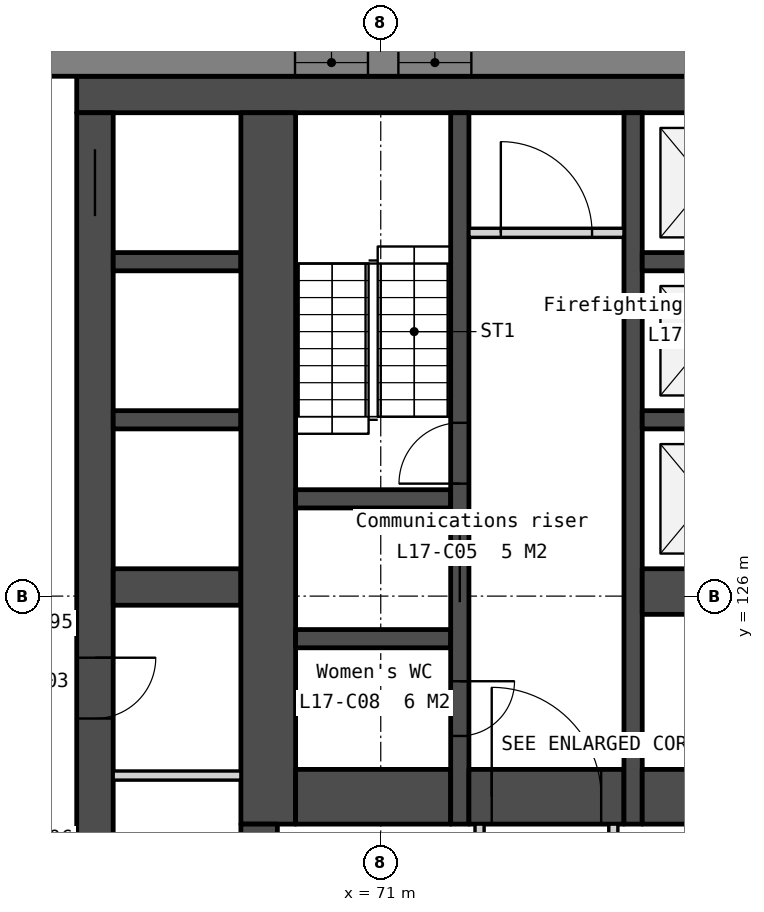
"""IFC4 building model, lengths in metres.
Left out: names, types, materials, properties, quantities, classifications, styles, units other than length and angle.
Written with IfcOpenShell. Run it as: python <this file> out.ifc"""

import sys

from ifc_helpers import new_model, si_unit, direction, frame, frame_2d, origin, place, context, subcontext, project, spatial, polyline, rectangle, outline, extrude, element, fill, save


model = new_model("IFC4")
c1 = context("Model", 3, precision=1e-05, world=origin(), true_north=direction((0.0, 1.0)))
c2 = subcontext(c1, "Body", "Model", "MODEL_VIEW")
j1 = project(units=[si_unit("LENGTHUNIT", "METRE"), si_unit("PLANEANGLEUNIT", "RADIAN")], contexts=[c1])
p1 = place(None, origin())
s1 = spatial("IfcSite", under=j1, at=p1, CompositionType="ELEMENT")
p2 = place(p1, origin())
s2 = spatial("IfcBuilding", under=s1, at=p2, CompositionType="ELEMENT")
p3 = place(p2, frame((0.0, 0.0, 73.5)))
s3 = spatial("IfcBuildingStorey", under=s2, at=p3, CompositionType="ELEMENT", Elevation=73.5)
p4 = place(p3, frame((66.0, 134.25, 0.0), z_axis=(0.0, 0.0, 1.0), x_axis=(1.0, 0.0, 0.0)))
e1 = element("IfcWall", 1, at=p4, inside=s3, PredefinedType="SOLIDWALL", context=c2, shape_type="SweptSolid", body=[
    extrude(rectangle(XDim=28.0, YDim=0.6, at=frame_2d((14.0, 0.0))), origin(), (0.0, 0.0, 1.0), 3.25),
])
p5 = place(p3, frame((66.3, 133.95, 0.0), z_axis=(0.0, 0.0, 1.0), x_axis=(0.0, -1.0, 0.0)))
e2 = element("IfcWall", 2, at=p5, inside=s3, PredefinedType="SOLIDWALL", context=c2, shape_type="SweptSolid", body=[
    extrude(rectangle(XDim=13.8, YDim=0.6, at=frame_2d((6.9, 0.0))), origin(), (0.0, 0.0, 1.0), 3.25),
])
p6 = place(p5, frame((0.6, 0.0, 0.0)))
e3 = element("IfcOpeningElement", 3, at=p6, cuts=e2, PredefinedType="OPENING", context=c2, shape_type="SweptSolid", body=[
    extrude(rectangle(XDim=1.1, YDim=2.1, at=frame_2d((0.55, 1.05))), frame((0.0, 0.31, 0.0), z_axis=(0.0, -1.0, 0.0), x_axis=(1.0, 0.0, 0.0)), (0.0, 0.0, 1.0), 0.62),
])
p7 = place(p5, frame((8.963, 0.0, 0.0)))
e4 = element("IfcOpeningElement", 4, at=p7, cuts=e2, PredefinedType="OPENING", context=c2, shape_type="SweptSolid", body=[
    extrude(rectangle(XDim=1.0, YDim=2.1, at=frame_2d((0.5, 1.05))), frame((0.0, 0.31, 0.0), z_axis=(0.0, -1.0, 0.0), x_axis=(1.0, 0.0, 0.0)), (0.0, 0.0, 1.0), 0.62),
])
p8 = place(p5, frame((11.888, 0.0, 0.0)))
e5 = element("IfcOpeningElement", 5, at=p8, cuts=e2, PredefinedType="OPENING", context=c2, shape_type="SweptSolid", body=[
    extrude(rectangle(XDim=1.0, YDim=2.1, at=frame_2d((0.5, 1.05))), frame((0.0, 0.31, 0.0), z_axis=(0.0, -1.0, 0.0), x_axis=(1.0, 0.0, 0.0)), (0.0, 0.0, 1.0), 0.62),
])
for number, where, z_axis, x_axis in (
    (6, (66.6, 131.5, 0.0), (0.0, 0.0, 1.0), (1.0, 0.0, 0.0)),
    (7, (66.6, 128.9, 0.0), (0.0, 0.0, 1.0), (1.0, 0.0, 0.0)),
):
    element("IfcWall", number, at=place(p3, frame(where, z_axis=z_axis, x_axis=x_axis)), inside=s3, PredefinedType="SOLIDWALL", context=c2, shape_type="SweptSolid", body=[
        extrude(rectangle(XDim=2.1, YDim=0.3, at=frame_2d((1.05, 0.0))), origin(), (0.0, 0.0, 1.0), 3.25),
    ])
p9 = place(p3, frame((66.6, 126.15, 0.0), z_axis=(0.0, 0.0, 1.0), x_axis=(1.0, 0.0, 0.0)))
e8 = element("IfcWall", 8, at=p9, inside=s3, PredefinedType="SOLIDWALL", context=c2, shape_type="SweptSolid", body=[
    extrude(rectangle(XDim=2.1, YDim=0.6, at=frame_2d((1.05, 0.0))), origin(), (0.0, 0.0, 1.0), 3.25),
])
p10 = place(p3, frame((66.6, 123.049, 0.0), z_axis=(0.0, 0.0, 1.0), x_axis=(1.0, 0.0, 0.0)))
e9 = element("IfcWall", 9, at=p10, inside=s3, PredefinedType="PARTITIONING", context=c2, shape_type="SweptSolid", body=[
    extrude(rectangle(XDim=2.1, YDim=0.15, at=frame_2d((1.05, 0.0))), origin(), (0.0, 0.0, 1.0), 3.25),
])
p11 = place(p3, frame((69.15, 133.95, 0.0), z_axis=(0.0, 0.0, 1.0), x_axis=(0.0, -1.0, 0.0)))
e10 = element("IfcWall", 10, at=p11, inside=s3, PredefinedType="SOLIDWALL", context=c2, shape_type="SweptSolid", body=[
    extrude(rectangle(XDim=11.7, YDim=0.9, at=frame_2d((5.85, 0.0))), origin(), (0.0, 0.0, 1.0), 3.25),
])
p12 = place(p3, frame((69.0, 122.25, 0.0), z_axis=(0.0, 0.0, 1.0), x_axis=(0.0, -1.0, 0.0)))
e11 = element("IfcWall", 11, at=p12, inside=s3, PredefinedType="SOLIDWALL", context=c2, shape_type="SweptSolid", body=[
    extrude(rectangle(XDim=2.1, YDim=0.6, at=frame_2d((1.05, 0.0))), origin(), (0.0, 0.0, 1.0), 3.25),
])
for number, where, z_axis, x_axis in (
    (12, (69.6, 127.6, 0.0), (0.0, 0.0, 1.0), (1.0, 0.0, 0.0)),
    (13, (69.6, 125.3, 0.0), (0.0, 0.0, 1.0), (1.0, 0.0, 0.0)),
):
    element("IfcWall", number, at=place(p3, frame(where, z_axis=z_axis, x_axis=x_axis)), inside=s3, PredefinedType="SOLIDWALL", context=c2, shape_type="SweptSolid", body=[
        extrude(rectangle(XDim=2.55, YDim=0.3, at=frame_2d((1.275, 0.0))), origin(), (0.0, 0.0, 1.0), 3.25),
    ])
p13 = place(p3, frame((69.6, 122.7, 0.0), z_axis=(0.0, 0.0, 1.0), x_axis=(1.0, 0.0, 0.0)))
e14 = element("IfcWall", 14, at=p13, inside=s3, PredefinedType="SOLIDWALL", context=c2, shape_type="SweptSolid", body=[
    extrude(rectangle(XDim=2.55, YDim=0.9, at=frame_2d((1.275, 0.0))), origin(), (0.0, 0.0, 1.0), 3.25),
])
p14 = place(p3, frame((72.3, 133.95, 0.0), z_axis=(0.0, 0.0, 1.0), x_axis=(0.0, -1.0, 0.0)))
e15 = element("IfcWall", 15, at=p14, inside=s3, PredefinedType="SOLIDWALL", context=c2, shape_type="SweptSolid", body=[
    extrude(rectangle(XDim=11.7, YDim=0.3, at=frame_2d((5.85, 0.0))), origin(), (0.0, 0.0, 1.0), 3.25),
])
p15 = place(p14, frame((6.95, 0.0, 0.0)))
e16 = element("IfcOpeningElement", 16, at=p15, cuts=e15, PredefinedType="OPENING", context=c2, shape_type="SweptSolid", body=[
    extrude(rectangle(XDim=1.1, YDim=2.1, at=frame_2d((0.55, 1.05))), frame((0.0, 0.16, 0.0), z_axis=(0.0, -1.0, 0.0), x_axis=(1.0, 0.0, 0.0)), (0.0, 0.0, 1.0), 0.32),
])
p16 = place(p14, frame((9.35, 0.0, 0.0)))
e17 = element("IfcOpeningElement", 17, at=p16, cuts=e15, PredefinedType="OPENING", context=c2, shape_type="SweptSolid", body=[
    extrude(rectangle(XDim=0.9, YDim=2.1, at=frame_2d((0.45, 1.05))), frame((0.0, 0.16, 0.0), z_axis=(0.0, -1.0, 0.0), x_axis=(1.0, 0.0, 0.0)), (0.0, 0.0, 1.0), 0.32),
])
p17 = place(p14, frame((5.1, 0.0, 0.0)))
e18 = element("IfcOpeningElement", 18, at=p17, cuts=e15, PredefinedType="OPENING", context=c2, shape_type="SweptSolid", body=[
    extrude(rectangle(XDim=1.0, YDim=2.1, at=frame_2d((0.5, 1.05))), frame((0.0, 0.16, 0.0), z_axis=(0.0, -1.0, 0.0), x_axis=(1.0, 0.0, 0.0)), (0.0, 0.0, 1.0), 0.32),
])
p18 = place(p3, frame((72.45, 131.975, 0.0), z_axis=(0.0, 0.0, 1.0), x_axis=(1.0, 0.0, 0.0)))
e19 = element("IfcWall", 19, at=p18, inside=s3, PredefinedType="PARTITIONING", context=c2, shape_type="SweptSolid", body=[
    extrude(rectangle(XDim=2.55, YDim=0.15, at=frame_2d((1.275, 0.0))), origin(), (0.0, 0.0, 1.0), 3.25),
])
p19 = place(p18, frame((0.525, 0.0, 0.0)))
e20 = element("IfcOpeningElement", 20, at=p19, cuts=e19, PredefinedType="OPENING", context=c2, shape_type="SweptSolid", body=[
    extrude(rectangle(XDim=1.5, YDim=2.1, at=frame_2d((0.75, 1.05))), frame((0.0, 0.085, 0.0), z_axis=(0.0, -1.0, 0.0), x_axis=(1.0, 0.0, 0.0)), (0.0, 0.0, 1.0), 0.17),
])
p20 = place(p3, frame((72.45, 122.7, 0.0), z_axis=(0.0, 0.0, 1.0), x_axis=(1.0, 0.0, 0.0)))
e21 = element("IfcWall", 21, at=p20, inside=s3, PredefinedType="SOLIDWALL", context=c2, shape_type="SweptSolid", body=[
    extrude(rectangle(XDim=2.55, YDim=0.9, at=frame_2d((1.275, 0.0))), origin(), (0.0, 0.0, 1.0), 3.25),
])
p21 = place(p20, frame((0.375, 0.0, 0.0)))
e22 = element("IfcOpeningElement", 22, at=p21, cuts=e21, PredefinedType="OPENING", context=c2, shape_type="SweptSolid", body=[
    extrude(rectangle(XDim=1.8, YDim=2.1, at=frame_2d((0.9, 1.05))), frame((0.0, 0.46, 0.0), z_axis=(0.0, -1.0, 0.0), x_axis=(1.0, 0.0, 0.0)), (0.0, 0.0, 1.0), 0.92),
])
for number, where, z_axis, x_axis in (
    (23, (72.625, 122.25, 0.0), (0.0, 0.0, 1.0), (0.0, -1.0, 0.0)),
    (24, (74.825, 122.25, 0.0), (0.0, 0.0, 1.0), (0.0, -1.0, 0.0)),
):
    element("IfcWall", number, at=place(p3, frame(where, z_axis=z_axis, x_axis=x_axis)), inside=s3, PredefinedType="PARTITIONING", context=c2, shape_type="SweptSolid", body=[
        extrude(rectangle(XDim=2.1, YDim=0.15, at=frame_2d((1.05, 0.0))), origin(), (0.0, 0.0, 1.0), 3.25),
    ])
p22 = place(p3, frame((75.15, 133.95, 0.0), z_axis=(0.0, 0.0, 1.0), x_axis=(0.0, -1.0, 0.0)))
e25 = element("IfcWall", 25, at=p22, inside=s3, PredefinedType="SOLIDWALL", context=c2, shape_type="SweptSolid", body=[
    extrude(rectangle(XDim=11.7, YDim=0.3, at=frame_2d((5.85, 0.0))), origin(), (0.0, 0.0, 1.0), 3.25),
])
for number, where, z_axis, x_axis in (
    (26, (75.3, 131.5, 0.0), (0.0, 0.0, 1.0), (1.0, 0.0, 0.0)),
    (27, (75.3, 128.9, 0.0), (0.0, 0.0, 1.0), (1.0, 0.0, 0.0)),
):
    element("IfcWall", number, at=place(p3, frame(where, z_axis=z_axis, x_axis=x_axis)), inside=s3, PredefinedType="SOLIDWALL", context=c2, shape_type="SweptSolid", body=[
        extrude(rectangle(XDim=2.1, YDim=0.3, at=frame_2d((1.05, 0.0))), origin(), (0.0, 0.0, 1.0), 3.25),
    ])
p23 = place(p3, frame((75.3, 126.075, 0.0), z_axis=(0.0, 0.0, 1.0), x_axis=(1.0, 0.0, 0.0)))
e28 = element("IfcWall", 28, at=p23, inside=s3, PredefinedType="SOLIDWALL", context=c2, shape_type="SweptSolid", body=[
    extrude(rectangle(XDim=2.1, YDim=0.75, at=frame_2d((1.05, 0.0))), origin(), (0.0, 0.0, 1.0), 3.25),
])
p24 = place(p3, frame((75.3, 122.7, 0.0), z_axis=(0.0, 0.0, 1.0), x_axis=(1.0, 0.0, 0.0)))
e29 = element("IfcWall", 29, at=p24, inside=s3, PredefinedType="SOLIDWALL", context=c2, shape_type="SweptSolid", body=[
    extrude(rectangle(XDim=6.2, YDim=0.9, at=frame_2d((3.1, 0.0))), origin(), (0.0, 0.0, 1.0), 3.25),
])
p25 = place(p3, frame((102.4, 134.775, -0.15), z_axis=(0.0, 0.0, 1.0), x_axis=(-1.0, 0.0, 0.0)))
e30 = element("IfcWall", 30, at=p25, inside=s3, PredefinedType="SOLIDWALL", context=c2, shape_type="SweptSolid", body=[
    extrude(outline(polyline([(44.8, 0.0), (44.8, 3.4), (0.0, 3.4), (0.0, 0.0), (44.8, 0.0)])), frame((0.0, 0.225, 0.0), z_axis=(0.0, -1.0, 0.0), x_axis=(1.0, 0.0, 0.0)), (0.0, 0.0, 1.0), 0.45),
])
p26 = place(p25, frame((3.03, 0.0, 1.05)))
e31 = element("IfcOpeningElement", 31, at=p26, cuts=e30, PredefinedType="OPENING", context=c2, shape_type="SweptSolid", body=[
    extrude(rectangle(XDim=1.2, YDim=1.5, at=frame_2d((0.6, 0.75))), frame((0.0, 0.235, 0.0), z_axis=(0.0, -1.0, 0.0), x_axis=(1.0, 0.0, 0.0)), (0.0, 0.0, 1.0), 0.47),
])
p27 = place(p25, frame((4.73, 0.0, 1.05)))
e32 = element("IfcOpeningElement", 32, at=p27, cuts=e30, PredefinedType="OPENING", context=c2, shape_type="SweptSolid", body=[
    extrude(rectangle(XDim=1.2, YDim=1.5, at=frame_2d((0.6, 0.75))), frame((0.0, 0.235, 0.0), z_axis=(0.0, -1.0, 0.0), x_axis=(1.0, 0.0, 0.0)), (0.0, 0.0, 1.0), 0.47),
])
p28 = place(p25, frame((11.99, 0.0, 1.05)))
e33 = element("IfcOpeningElement", 33, at=p28, cuts=e30, PredefinedType="OPENING", context=c2, shape_type="SweptSolid", body=[
    extrude(rectangle(XDim=1.2, YDim=1.5, at=frame_2d((0.6, 0.75))), frame((0.0, 0.235, 0.0), z_axis=(0.0, -1.0, 0.0), x_axis=(1.0, 0.0, 0.0)), (0.0, 0.0, 1.0), 0.47),
])
p29 = place(p25, frame((13.69, 0.0, 1.05)))
e34 = element("IfcOpeningElement", 34, at=p29, cuts=e30, PredefinedType="OPENING", context=c2, shape_type="SweptSolid", body=[
    extrude(rectangle(XDim=1.2, YDim=1.5, at=frame_2d((0.6, 0.75))), frame((0.0, 0.235, 0.0), z_axis=(0.0, -1.0, 0.0), x_axis=(1.0, 0.0, 0.0)), (0.0, 0.0, 1.0), 0.47),
])
p30 = place(p25, frame((20.95, 0.0, 1.05)))
e35 = element("IfcOpeningElement", 35, at=p30, cuts=e30, PredefinedType="OPENING", context=c2, shape_type="SweptSolid", body=[
    extrude(rectangle(XDim=1.2, YDim=1.5, at=frame_2d((0.6, 0.75))), frame((0.0, 0.235, 0.0), z_axis=(0.0, -1.0, 0.0), x_axis=(1.0, 0.0, 0.0)), (0.0, 0.0, 1.0), 0.47),
])
p31 = place(p25, frame((22.65, 0.0, 1.05)))
e36 = element("IfcOpeningElement", 36, at=p31, cuts=e30, PredefinedType="OPENING", context=c2, shape_type="SweptSolid", body=[
    extrude(rectangle(XDim=1.2, YDim=1.5, at=frame_2d((0.6, 0.75))), frame((0.0, 0.235, 0.0), z_axis=(0.0, -1.0, 0.0), x_axis=(1.0, 0.0, 0.0)), (0.0, 0.0, 1.0), 0.47),
])
p32 = place(p25, frame((29.91, 0.0, 1.05)))
e37 = element("IfcOpeningElement", 37, at=p32, cuts=e30, PredefinedType="OPENING", context=c2, shape_type="SweptSolid", body=[
    extrude(rectangle(XDim=1.2, YDim=1.5, at=frame_2d((0.6, 0.75))), frame((0.0, 0.235, 0.0), z_axis=(0.0, -1.0, 0.0), x_axis=(1.0, 0.0, 0.0)), (0.0, 0.0, 1.0), 0.47),
])
p33 = place(p25, frame((31.61, 0.0, 1.05)))
e38 = element("IfcOpeningElement", 38, at=p33, cuts=e30, PredefinedType="OPENING", context=c2, shape_type="SweptSolid", body=[
    extrude(rectangle(XDim=1.2, YDim=1.5, at=frame_2d((0.6, 0.75))), frame((0.0, 0.235, 0.0), z_axis=(0.0, -1.0, 0.0), x_axis=(1.0, 0.0, 0.0)), (0.0, 0.0, 1.0), 0.47),
])
p34 = place(p25, frame((38.87, 0.0, 1.05)))
e39 = element("IfcOpeningElement", 39, at=p34, cuts=e30, PredefinedType="OPENING", context=c2, shape_type="SweptSolid", body=[
    extrude(rectangle(XDim=1.2, YDim=1.5, at=frame_2d((0.6, 0.75))), frame((0.0, 0.235, 0.0), z_axis=(0.0, -1.0, 0.0), x_axis=(1.0, 0.0, 0.0)), (0.0, 0.0, 1.0), 0.47),
])
p35 = place(p25, frame((40.57, 0.0, 1.05)))
e40 = element("IfcOpeningElement", 40, at=p35, cuts=e30, PredefinedType="OPENING", context=c2, shape_type="SweptSolid", body=[
    extrude(rectangle(XDim=1.2, YDim=1.5, at=frame_2d((0.6, 0.75))), frame((0.0, 0.235, 0.0), z_axis=(0.0, -1.0, 0.0), x_axis=(1.0, 0.0, 0.0)), (0.0, 0.0, 1.0), 0.47),
])
p36 = place(p3, frame((54.495, 129.397, -0.15), z_axis=(0.0, 0.0, 1.0), x_axis=(0.499999201451, -0.866025864826, 0.0)))
e41 = element("IfcWall", 41, at=p36, inside=s3, PredefinedType="SOLIDWALL", context=c2, shape_type="SweptSolid", body=[
    extrude(outline(polyline([(44.8, 0.0), (44.8, 3.4), (0.0, 3.4), (0.0, 0.0), (44.8, 0.0)])), frame((0.0, 0.225, 0.0), z_axis=(0.0, -1.0, 0.0), x_axis=(1.0, 0.0, 0.0)), (0.0, 0.0, 1.0), 0.45),
])
p37 = place(p36, frame((3.03, 0.0, 1.05)))
e42 = element("IfcOpeningElement", 42, at=p37, cuts=e41, PredefinedType="OPENING", context=c2, shape_type="SweptSolid", body=[
    extrude(rectangle(XDim=1.2, YDim=1.5, at=frame_2d((0.6, 0.75))), frame((0.0, 0.235, 0.0), z_axis=(0.0, -1.0, 0.0), x_axis=(1.0, 0.0, 0.0)), (0.0, 0.0, 1.0), 0.47),
])
p38 = place(p36, frame((4.73, 0.0, 1.05)))
e43 = element("IfcOpeningElement", 43, at=p38, cuts=e41, PredefinedType="OPENING", context=c2, shape_type="SweptSolid", body=[
    extrude(rectangle(XDim=1.2, YDim=1.5, at=frame_2d((0.6, 0.75))), frame((0.0, 0.235, 0.0), z_axis=(0.0, -1.0, 0.0), x_axis=(1.0, 0.0, 0.0)), (0.0, 0.0, 1.0), 0.47),
])
p39 = place(p36, frame((11.99, 0.0, 1.05)))
e44 = element("IfcOpeningElement", 44, at=p39, cuts=e41, PredefinedType="OPENING", context=c2, shape_type="SweptSolid", body=[
    extrude(rectangle(XDim=1.2, YDim=1.5, at=frame_2d((0.6, 0.75))), frame((0.0, 0.235, 0.0), z_axis=(0.0, -1.0, 0.0), x_axis=(1.0, 0.0, 0.0)), (0.0, 0.0, 1.0), 0.47),
])
p40 = place(p36, frame((13.69, 0.0, 1.05)))
e45 = element("IfcOpeningElement", 45, at=p40, cuts=e41, PredefinedType="OPENING", context=c2, shape_type="SweptSolid", body=[
    extrude(rectangle(XDim=1.2, YDim=1.5, at=frame_2d((0.6, 0.75))), frame((0.0, 0.235, 0.0), z_axis=(0.0, -1.0, 0.0), x_axis=(1.0, 0.0, 0.0)), (0.0, 0.0, 1.0), 0.47),
])
p41 = place(p36, frame((20.95, 0.0, 1.05)))
e46 = element("IfcOpeningElement", 46, at=p41, cuts=e41, PredefinedType="OPENING", context=c2, shape_type="SweptSolid", body=[
    extrude(rectangle(XDim=1.2, YDim=1.5, at=frame_2d((0.6, 0.75))), frame((0.0, 0.235, 0.0), z_axis=(0.0, -1.0, 0.0), x_axis=(1.0, 0.0, 0.0)), (0.0, 0.0, 1.0), 0.47),
])
p42 = place(p36, frame((22.65, 0.0, 1.05)))
e47 = element("IfcOpeningElement", 47, at=p42, cuts=e41, PredefinedType="OPENING", context=c2, shape_type="SweptSolid", body=[
    extrude(rectangle(XDim=1.2, YDim=1.5, at=frame_2d((0.6, 0.75))), frame((0.0, 0.235, 0.0), z_axis=(0.0, -1.0, 0.0), x_axis=(1.0, 0.0, 0.0)), (0.0, 0.0, 1.0), 0.47),
])
p43 = place(p36, frame((29.91, 0.0, 1.05)))
e48 = element("IfcOpeningElement", 48, at=p43, cuts=e41, PredefinedType="OPENING", context=c2, shape_type="SweptSolid", body=[
    extrude(rectangle(XDim=1.2, YDim=1.5, at=frame_2d((0.6, 0.75))), frame((0.0, 0.235, 0.0), z_axis=(0.0, -1.0, 0.0), x_axis=(1.0, 0.0, 0.0)), (0.0, 0.0, 1.0), 0.47),
])
p44 = place(p36, frame((31.61, 0.0, 1.05)))
e49 = element("IfcOpeningElement", 49, at=p44, cuts=e41, PredefinedType="OPENING", context=c2, shape_type="SweptSolid", body=[
    extrude(rectangle(XDim=1.2, YDim=1.5, at=frame_2d((0.6, 0.75))), frame((0.0, 0.235, 0.0), z_axis=(0.0, -1.0, 0.0), x_axis=(1.0, 0.0, 0.0)), (0.0, 0.0, 1.0), 0.47),
])
p45 = place(p36, frame((38.87, 0.0, 1.05)))
e50 = element("IfcOpeningElement", 50, at=p45, cuts=e41, PredefinedType="OPENING", context=c2, shape_type="SweptSolid", body=[
    extrude(rectangle(XDim=1.2, YDim=1.5, at=frame_2d((0.6, 0.75))), frame((0.0, 0.235, 0.0), z_axis=(0.0, -1.0, 0.0), x_axis=(1.0, 0.0, 0.0)), (0.0, 0.0, 1.0), 0.47),
])
p46 = place(p36, frame((40.57, 0.0, 1.05)))
e51 = element("IfcOpeningElement", 51, at=p46, cuts=e41, PredefinedType="OPENING", context=c2, shape_type="SweptSolid", body=[
    extrude(rectangle(XDim=1.2, YDim=1.5, at=frame_2d((0.6, 0.75))), frame((0.0, 0.235, 0.0), z_axis=(0.0, -1.0, 0.0), x_axis=(1.0, 0.0, 0.0)), (0.0, 0.0, 1.0), 0.47),
])
p47 = place(p6, origin())
e52 = element("IfcDoor", 52, at=p47, inside=s3, OperationType="SLIDING_TO_LEFT", PredefinedType="DOOR", context=c2, shape_type="SweptSolid", body=[
    extrude(rectangle(XDim=1.1, YDim=2.1, at=frame_2d((0.55, 1.05))), frame((0.0, 0.025, 0.0), z_axis=(0.0, -1.0, 0.0), x_axis=(1.0, 0.0, 0.0)), (0.0, 0.0, 1.0), 0.05),
])
fill(e3, e52)
p48 = place(p15, origin())
e53 = element("IfcDoor", 53, at=p48, inside=s3, OperationType="SLIDING_TO_LEFT", PredefinedType="DOOR", context=c2, shape_type="SweptSolid", body=[
    extrude(rectangle(XDim=1.1, YDim=2.1, at=frame_2d((0.55, 1.05))), frame((0.0, 0.025, 0.0), z_axis=(0.0, -1.0, 0.0), x_axis=(1.0, 0.0, 0.0)), (0.0, 0.0, 1.0), 0.05),
])
fill(e16, e53)
p49 = place(p21, origin())
e54 = element("IfcDoor", 54, at=p49, inside=s3, OperationType="DOUBLE_DOOR_DOUBLE_SWING", PredefinedType="DOOR", context=c2, shape_type="SweptSolid", body=[
    extrude(rectangle(XDim=1.8, YDim=2.1, at=frame_2d((0.9, 1.05))), frame((0.0, 0.025, 0.0), z_axis=(0.0, -1.0, 0.0), x_axis=(1.0, 0.0, 0.0)), (0.0, 0.0, 1.0), 0.05),
])
fill(e22, e54)
p50 = place(p19, origin())
e55 = element("IfcDoor", 55, at=p50, inside=s3, OperationType="DOUBLE_DOOR_DOUBLE_SWING", PredefinedType="DOOR", context=c2, shape_type="SweptSolid", body=[
    extrude(rectangle(XDim=1.5, YDim=2.1, at=frame_2d((0.75, 1.05))), frame((0.0, 0.025, 0.0), z_axis=(0.0, -1.0, 0.0), x_axis=(1.0, 0.0, 0.0)), (0.0, 0.0, 1.0), 0.05),
])
fill(e20, e55)
p51 = place(p16, origin())
e56 = element("IfcDoor", 56, at=p51, inside=s3, OperationType="SINGLE_SWING_LEFT", PredefinedType="DOOR", context=c2, shape_type="SweptSolid", body=[
    extrude(rectangle(XDim=0.9, YDim=2.1, at=frame_2d((0.45, 1.05))), frame((0.0, 0.025, 0.0), z_axis=(0.0, -1.0, 0.0), x_axis=(1.0, 0.0, 0.0)), (0.0, 0.0, 1.0), 0.05),
])
fill(e17, e56)
p52 = place(p17, origin())
e57 = element("IfcDoor", 57, at=p52, inside=s3, OperationType="SINGLE_SWING_RIGHT", PredefinedType="DOOR", context=c2, shape_type="SweptSolid", body=[
    extrude(rectangle(XDim=1.0, YDim=2.1, at=frame_2d((0.5, 1.05))), frame((0.0, 0.025, 0.0), z_axis=(0.0, -1.0, 0.0), x_axis=(1.0, 0.0, 0.0)), (0.0, 0.0, 1.0), 0.05),
])
fill(e18, e57)
p53 = place(p7, origin())
e58 = element("IfcDoor", 58, at=p53, inside=s3, OperationType="SINGLE_SWING_LEFT", PredefinedType="DOOR", context=c2, shape_type="SweptSolid", body=[
    extrude(rectangle(XDim=1.0, YDim=2.1, at=frame_2d((0.5, 1.05))), frame((0.0, 0.025, 0.0), z_axis=(0.0, -1.0, 0.0), x_axis=(1.0, 0.0, 0.0)), (0.0, 0.0, 1.0), 0.05),
])
fill(e4, e58)
p54 = place(p32, origin())
e59 = element("IfcWindow", 59, at=p54, inside=s3, PartitioningType="SINGLE_PANEL", PredefinedType="WINDOW", context=c2, shape_type="SweptSolid", body=[
    extrude(rectangle(XDim=1.2, YDim=1.5, at=frame_2d((0.6, 0.75))), frame((0.0, 0.03, 0.0), z_axis=(0.0, -1.0, 0.0), x_axis=(1.0, 0.0, 0.0)), (0.0, 0.0, 1.0), 0.06),
])
fill(e37, e59)
p55 = place(p33, origin())
e60 = element("IfcWindow", 60, at=p55, inside=s3, PartitioningType="SINGLE_PANEL", PredefinedType="WINDOW", context=c2, shape_type="SweptSolid", body=[
    extrude(rectangle(XDim=1.2, YDim=1.5, at=frame_2d((0.6, 0.75))), frame((0.0, 0.03, 0.0), z_axis=(0.0, -1.0, 0.0), x_axis=(1.0, 0.0, 0.0)), (0.0, 0.0, 1.0), 0.06),
])
fill(e38, e60)
save(model, sys.argv[1])
